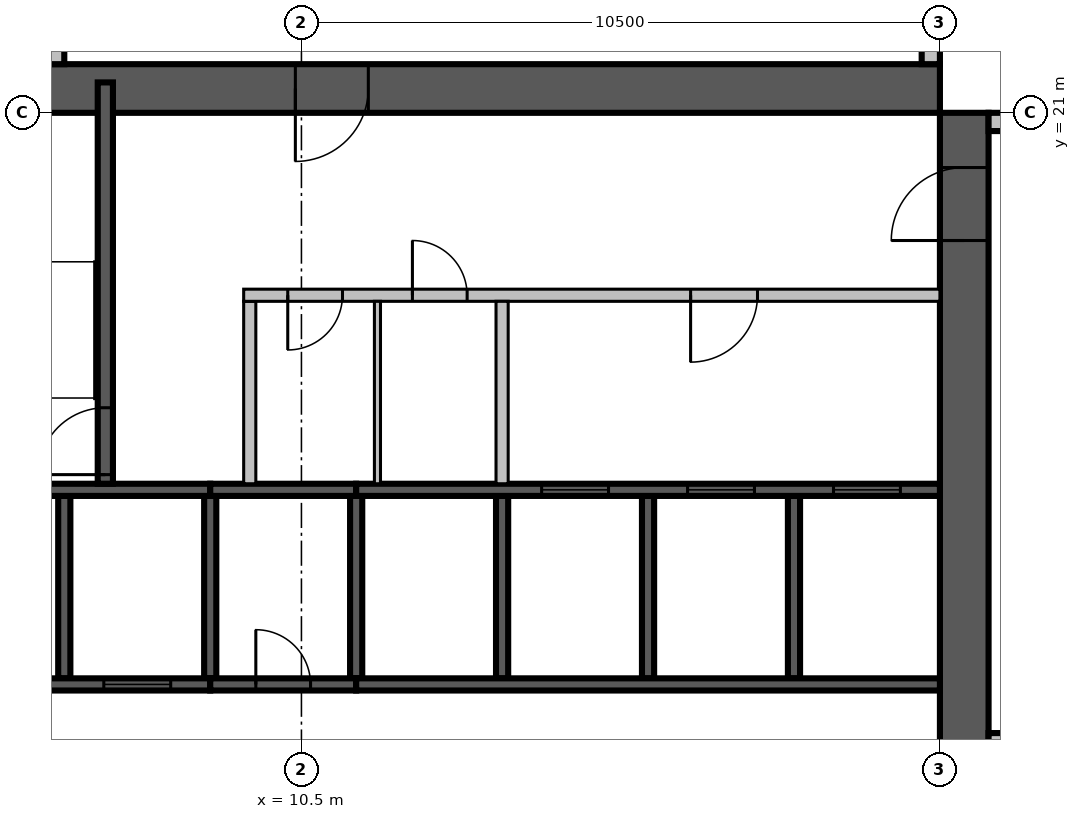
"""IFC4 building model, lengths in metres.
Left out: names, types, materials, properties, quantities, classifications, styles, units other than length and angle.
Written with IfcOpenShell. Run it as: python <this file> out.ifc"""

import sys

from ifc_helpers import new_model, si_unit, direction, frame, frame_2d, origin, place, context, subcontext, project, spatial, rectangle, extrude, source, transform, mapped, element, fill, save


model = new_model("IFC4")
c1 = context("Model", 3, precision=1e-05, world=origin(), true_north=direction((0.0, 1.0)))
c2 = subcontext(c1, "Body", "Model", "MODEL_VIEW")
j1 = project(units=[si_unit("LENGTHUNIT", "METRE"), si_unit("PLANEANGLEUNIT", "RADIAN")], contexts=[c1])
p1 = place(None, origin())
s1 = spatial("IfcSite", under=j1, at=p1, CompositionType="ELEMENT")
p2 = place(p1, origin())
s2 = spatial("IfcBuilding", under=s1, at=p2, CompositionType="ELEMENT")
p3 = place(p2, frame((0.0, 0.0, 253.8)))
s3 = spatial("IfcBuildingStorey", under=s2, at=p3, CompositionType="ELEMENT", Elevation=253.8)
m1 = source(origin(), c2, "Body", "SweptSolid", [
    extrude(rectangle(XDim=16.8, YDim=0.8, at=frame_2d((8.4, 0.0))), origin(), (0.0, 0.0, 1.0), 3.8),
])
p4 = place(p3, frame((21.4, 4.2, 0.0), z_axis=(0.0, 0.0, 1.0), x_axis=(0.0, 1.0, 0.0)))
e1 = element("IfcWall", 1, at=p4, inside=s3, PredefinedType="SHEAR", context=c2, shape_type="MappedRepresentation", body=[
    mapped(m1, transform((0.0, 0.0, 0.0), scale=1.0)),
])
m2 = source(origin(), c2, "Body", "SweptSolid", [
    extrude(rectangle(XDim=2.2, YDim=2.1, at=frame_2d((1.1, 1.05))), frame((0.0, 0.41, 0.0), z_axis=(0.0, -1.0, 0.0), x_axis=(1.0, 0.0, 0.0)), (0.0, 0.0, 1.0), 0.82),
])
p5 = place(p4, frame((4.2, 0.0, 0.0)))
e2 = element("IfcOpeningElement", 2, at=p5, cuts=e1, PredefinedType="OPENING", context=c2, shape_type="MappedRepresentation", body=[
    mapped(m2, transform((0.0, 0.0, 0.0), scale=1.0)),
])
m3 = source(origin(), c2, "Body", "SweptSolid", [
    extrude(rectangle(XDim=1.2, YDim=2.1, at=frame_2d((0.6, 1.05))), frame((0.0, 0.41, 0.0), z_axis=(0.0, -1.0, 0.0), x_axis=(1.0, 0.0, 0.0)), (0.0, 0.0, 1.0), 0.82),
])
p6 = place(p4, frame((14.7, 0.0, 0.0)))
e3 = element("IfcOpeningElement", 3, at=p6, cuts=e1, PredefinedType="OPENING", context=c2, shape_type="MappedRepresentation", body=[
    mapped(m3, transform((0.0, 0.0, 0.0), scale=1.0)),
])
p7 = place(p3, frame((4.2, 21.4, 0.0), z_axis=(0.0, 0.0, 1.0), x_axis=(1.0, 0.0, 0.0)))
e4 = element("IfcWall", 4, at=p7, inside=s3, PredefinedType="SHEAR", context=c2, shape_type="MappedRepresentation", body=[
    mapped(m1, transform((0.0, 0.0, 0.0), scale=1.0)),
])
p8 = place(p7, frame((6.2, 0.0, 0.0)))
e5 = element("IfcOpeningElement", 5, at=p8, cuts=e4, PredefinedType="OPENING", context=c2, shape_type="MappedRepresentation", body=[
    mapped(m3, transform((0.0, 0.0, 0.0), scale=1.0)),
])
m4 = source(origin(), c2, "Body", "SweptSolid", [
    extrude(rectangle(XDim=7.2, YDim=0.3, at=frame_2d((3.6, 0.0))), origin(), (0.0, 0.0, 1.0), 3.4),
])
p9 = place(p3, frame((21.8, 10.65, 0.0), z_axis=(0.0, 0.0, 1.0), x_axis=(1.0, 0.0, 0.0)))
e6 = element("IfcWall", 6, at=p9, inside=s3, PredefinedType="STANDARD", context=c2, shape_type="MappedRepresentation", body=[
    mapped(m4, transform((0.0, 0.0, 0.0), scale=1.0)),
])
m5 = source(origin(), c2, "Body", "SweptSolid", [
    extrude(rectangle(XDim=1.8, YDim=2.4, at=frame_2d((0.9, 1.2))), frame((0.0, 0.16, 0.0), z_axis=(0.0, -1.0, 0.0), x_axis=(1.0, 0.0, 0.0)), (0.0, 0.0, 1.0), 0.32),
])
p10 = place(p9, frame((0.4, 0.0, 0.0)))
e7 = element("IfcOpeningElement", 7, at=p10, cuts=e6, PredefinedType="OPENING", context=c2, shape_type="MappedRepresentation", body=[
    mapped(m5, transform((0.0, 0.0, 0.0), scale=1.0)),
])
p11 = place(p9, frame((4.6, 0.0, 0.0)))
e8 = element("IfcOpeningElement", 8, at=p11, cuts=e6, PredefinedType="OPENING", context=c2, shape_type="MappedRepresentation", body=[
    mapped(m5, transform((0.0, 0.0, 0.0), scale=1.0)),
])
p12 = place(p3, frame((29.0, 20.85, 0.0), z_axis=(0.0, 0.0, 1.0), x_axis=(-1.0, 0.0, 0.0)))
e9 = element("IfcWall", 9, at=p12, inside=s3, PredefinedType="STANDARD", context=c2, shape_type="MappedRepresentation", body=[
    mapped(m4, transform((0.0, 0.0, 0.0), scale=1.0)),
])
m6 = source(origin(), c2, "Body", "SweptSolid", [
    extrude(rectangle(XDim=1.8, YDim=2.3, at=frame_2d((0.9, 1.15))), frame((0.0, 0.16, 0.0), z_axis=(0.0, -1.0, 0.0), x_axis=(1.0, 0.0, 0.0)), (0.0, 0.0, 1.0), 0.32),
])
p13 = place(p12, frame((0.613, 0.0, 0.6)))
e10 = element("IfcOpeningElement", 10, at=p13, cuts=e9, PredefinedType="OPENING", context=c2, shape_type="MappedRepresentation", body=[
    mapped(m6, transform((0.0, 0.0, 0.0), scale=1.0)),
])
p14 = place(p12, frame((5.0, 0.0, 0.6)))
e11 = element("IfcOpeningElement", 11, at=p14, cuts=e9, PredefinedType="OPENING", context=c2, shape_type="MappedRepresentation", body=[
    mapped(m6, transform((0.0, 0.0, 0.0), scale=1.0)),
])
m7 = source(origin(), c2, "Body", "SweptSolid", [
    extrude(rectangle(XDim=7.2, YDim=0.3, at=frame_2d((3.6, 0.0))), origin(), (0.0, 0.0, 1.0), 2.9),
])
p15 = place(p3, frame((20.85, 21.8, 0.0), z_axis=(0.0, 0.0, 1.0), x_axis=(0.0, 1.0, 0.0)))
e12 = element("IfcWall", 12, at=p15, inside=s3, PredefinedType="STANDARD", context=c2, shape_type="MappedRepresentation", body=[
    mapped(m7, transform((0.0, 0.0, 0.0), scale=1.0)),
])
p16 = place(p15, frame((0.4, 0.0, 0.6)))
e13 = element("IfcOpeningElement", 13, at=p16, cuts=e12, PredefinedType="OPENING", context=c2, shape_type="MappedRepresentation", body=[
    mapped(m6, transform((0.0, 0.0, 0.0), scale=1.0)),
])
p17 = place(p15, frame((4.787, 0.0, 0.6)))
e14 = element("IfcOpeningElement", 14, at=p17, cuts=e12, PredefinedType="OPENING", context=c2, shape_type="MappedRepresentation", body=[
    mapped(m6, transform((0.0, 0.0, 0.0), scale=1.0)),
])
m8 = source(origin(), c2, "Body", "SweptSolid", [
    extrude(rectangle(XDim=16.6, YDim=0.3, at=frame_2d((8.3, 0.0))), origin(), (0.0, 0.0, 1.0), 3.4),
])
p18 = place(p3, frame((6.45, 38.4, 0.0), z_axis=(0.0, 0.0, 1.0), x_axis=(0.0, -1.0, 0.0)))
e15 = element("IfcWall", 15, at=p18, inside=s3, PredefinedType="STANDARD", context=c2, shape_type="MappedRepresentation", body=[
    mapped(m8, transform((0.0, 0.0, 0.0), scale=1.0)),
])
p19 = place(p18, frame((1.15, 0.0, 0.6)))
e16 = element("IfcOpeningElement", 16, at=p19, cuts=e15, PredefinedType="OPENING", context=c2, shape_type="MappedRepresentation", body=[
    mapped(m6, transform((0.0, 0.0, 0.0), scale=1.0)),
])
p20 = place(p18, frame((9.438, 0.0, 0.6)))
e17 = element("IfcOpeningElement", 17, at=p20, cuts=e15, PredefinedType="OPENING", context=c2, shape_type="MappedRepresentation", body=[
    mapped(m6, transform((0.0, 0.0, 0.0), scale=1.0)),
])
m9 = source(origin(), c2, "Body", "SweptSolid", [
    extrude(rectangle(XDim=3.0, YDim=2.3, at=frame_2d((1.5, 1.15))), frame((0.0, 0.16, 0.0), z_axis=(0.0, -1.0, 0.0), x_axis=(1.0, 0.0, 0.0)), (0.0, 0.0, 1.0), 0.32),
])
p21 = place(p18, frame((12.7, 0.0, 0.6)))
e18 = element("IfcOpeningElement", 18, at=p21, cuts=e15, PredefinedType="OPENING", context=c2, shape_type="MappedRepresentation", body=[
    mapped(m9, transform((0.0, 0.0, 0.0), scale=1.0)),
])
m10 = source(origin(), c2, "Body", "SweptSolid", [
    extrude(rectangle(XDim=1.0, YDim=2.1, at=frame_2d((0.5, 1.05))), frame((0.0, 0.16, 0.0), z_axis=(0.0, -1.0, 0.0), x_axis=(1.0, 0.0, 0.0)), (0.0, 0.0, 1.0), 0.32),
])
p22 = place(p18, frame((5.45, 0.0, 0.0)))
e19 = element("IfcOpeningElement", 19, at=p22, cuts=e15, PredefinedType="OPENING", context=c2, shape_type="MappedRepresentation", body=[
    mapped(m10, transform((0.0, 0.0, 0.0), scale=1.0)),
])
m11 = source(origin(), c2, "Body", "SweptSolid", [
    extrude(rectangle(XDim=3.0, YDim=0.2, at=frame_2d((1.5, 0.0))), origin(), (0.0, 0.0, 1.0), 3.8),
])
p23 = place(p3, frame((6.6, 11.7, 0.0), z_axis=(0.0, 0.0, 1.0), x_axis=(0.0, 1.0, 0.0)))
e20 = element("IfcWall", 20, at=p23, inside=s3, PredefinedType="SOLIDWALL", context=c2, shape_type="MappedRepresentation", body=[
    mapped(m11, transform((0.0, 0.0, 0.0), scale=1.0)),
])
m12 = source(origin(), c2, "Body", "SweptSolid", [
    extrude(rectangle(XDim=3.0, YDim=0.2, at=frame_2d((1.5, 0.0))), origin(), (0.0, 0.0, 1.0), 3.4),
])
for number, where, z_axis, x_axis in (
    (21, (9.0, 11.7, 0.0), (0.0, 0.0, 1.0), (0.0, 1.0, 0.0)),
    (22, (11.4, 11.7, 0.0), (0.0, 0.0, 1.0), (0.0, 1.0, 0.0)),
):
    element("IfcWall", number, at=place(p3, frame(where, z_axis=z_axis, x_axis=x_axis)), inside=s3, PredefinedType="SOLIDWALL", context=c2, shape_type="MappedRepresentation", body=[
        mapped(m12, transform((0.0, 0.0, 0.0), scale=1.0)),
    ])
for number, where, z_axis, x_axis in (
    (23, (13.8, 11.7, 0.0), (0.0, 0.0, 1.0), (0.0, 1.0, 0.0)),
    (24, (16.2, 11.7, 0.0), (0.0, 0.0, 1.0), (0.0, 1.0, 0.0)),
    (25, (18.6, 11.7, 0.0), (0.0, 0.0, 1.0), (0.0, 1.0, 0.0)),
):
    element("IfcWall", number, at=place(p3, frame(where, z_axis=z_axis, x_axis=x_axis)), inside=s3, PredefinedType="SOLIDWALL", context=c2, shape_type="MappedRepresentation", body=[
        mapped(m11, transform((0.0, 0.0, 0.0), scale=1.0)),
    ])
m13 = source(origin(), c2, "Body", "SweptSolid", [
    extrude(rectangle(XDim=4.8, YDim=0.2, at=frame_2d((2.4, 0.0))), origin(), (0.0, 0.0, 1.0), 3.8),
])
p24 = place(p3, frame((4.2, 11.6, 0.0), z_axis=(0.0, 0.0, 1.0), x_axis=(1.0, 0.0, 0.0)))
e26 = element("IfcWall", 26, at=p24, inside=s3, PredefinedType="SOLIDWALL", context=c2, shape_type="MappedRepresentation", body=[
    mapped(m13, transform((0.0, 0.0, 0.0), scale=1.0)),
])
m14 = source(origin(), c2, "Body", "SweptSolid", [
    extrude(rectangle(XDim=1.1, YDim=2.1, at=frame_2d((0.55, 1.05))), frame((0.0, 0.11, 0.0), z_axis=(0.0, -1.0, 0.0), x_axis=(1.0, 0.0, 0.0)), (0.0, 0.0, 1.0), 0.22),
])
p25 = place(p24, frame((0.65, 0.0, 0.0)))
e27 = element("IfcOpeningElement", 27, at=p25, cuts=e26, PredefinedType="OPENING", context=c2, shape_type="MappedRepresentation", body=[
    mapped(m14, transform((0.0, 0.0, 0.0), scale=1.0)),
])
p26 = place(p24, frame((3.05, 0.0, 0.0)))
e28 = element("IfcOpeningElement", 28, at=p26, cuts=e26, PredefinedType="OPENING", context=c2, shape_type="MappedRepresentation", body=[
    mapped(m14, transform((0.0, 0.0, 0.0), scale=1.0)),
])
m15 = source(origin(), c2, "Body", "SweptSolid", [
    extrude(rectangle(XDim=2.4, YDim=0.2, at=frame_2d((1.2, 0.0))), origin(), (0.0, 0.0, 1.0), 3.4),
])
p27 = place(p3, frame((9.0, 11.6, 0.0), z_axis=(0.0, 0.0, 1.0), x_axis=(1.0, 0.0, 0.0)))
e29 = element("IfcWall", 29, at=p27, inside=s3, PredefinedType="SOLIDWALL", context=c2, shape_type="MappedRepresentation", body=[
    mapped(m15, transform((0.0, 0.0, 0.0), scale=1.0)),
])
m16 = source(origin(), c2, "Body", "SweptSolid", [
    extrude(rectangle(XDim=0.9, YDim=2.1, at=frame_2d((0.45, 1.05))), frame((0.0, 0.11, 0.0), z_axis=(0.0, -1.0, 0.0), x_axis=(1.0, 0.0, 0.0)), (0.0, 0.0, 1.0), 0.22),
])
p28 = place(p27, frame((0.75, 0.0, 0.0)))
e30 = element("IfcOpeningElement", 30, at=p28, cuts=e29, PredefinedType="OPENING", context=c2, shape_type="MappedRepresentation", body=[
    mapped(m16, transform((0.0, 0.0, 0.0), scale=1.0)),
])
m17 = source(origin(), c2, "Body", "SweptSolid", [
    extrude(rectangle(XDim=9.6, YDim=0.2, at=frame_2d((4.8, 0.0))), origin(), (0.0, 0.0, 1.0), 3.8),
])
p29 = place(p3, frame((11.4, 11.6, 0.0), z_axis=(0.0, 0.0, 1.0), x_axis=(1.0, 0.0, 0.0)))
e31 = element("IfcWall", 31, at=p29, inside=s3, PredefinedType="SOLIDWALL", context=c2, shape_type="MappedRepresentation", body=[
    mapped(m17, transform((0.0, 0.0, 0.0), scale=1.0)),
])
p30 = place(p3, frame((4.2, 14.8, 0.0), z_axis=(0.0, 0.0, 1.0), x_axis=(1.0, 0.0, 0.0)))
e32 = element("IfcWall", 32, at=p30, inside=s3, PredefinedType="SOLIDWALL", context=c2, shape_type="MappedRepresentation", body=[
    mapped(m13, transform((0.0, 0.0, 0.0), scale=1.0)),
])
p31 = place(p3, frame((9.0, 14.8, 0.0), z_axis=(0.0, 0.0, 1.0), x_axis=(1.0, 0.0, 0.0)))
e33 = element("IfcWall", 33, at=p31, inside=s3, PredefinedType="SOLIDWALL", context=c2, shape_type="MappedRepresentation", body=[
    mapped(m15, transform((0.0, 0.0, 0.0), scale=1.0)),
])
p32 = place(p3, frame((11.4, 14.8, 0.0), z_axis=(0.0, 0.0, 1.0), x_axis=(1.0, 0.0, 0.0)))
e34 = element("IfcWall", 34, at=p32, inside=s3, PredefinedType="SOLIDWALL", context=c2, shape_type="MappedRepresentation", body=[
    mapped(m17, transform((0.0, 0.0, 0.0), scale=1.0)),
])
p33 = place(p32, frame((3.05, 0.0, 0.0)))
e35 = element("IfcOpeningElement", 35, at=p33, cuts=e34, PredefinedType="OPENING", context=c2, shape_type="MappedRepresentation", body=[
    mapped(m14, transform((0.0, 0.0, 0.0), scale=1.0)),
])
p34 = place(p32, frame((5.45, 0.0, 0.0)))
e36 = element("IfcOpeningElement", 36, at=p34, cuts=e34, PredefinedType="OPENING", context=c2, shape_type="MappedRepresentation", body=[
    mapped(m14, transform((0.0, 0.0, 0.0), scale=1.0)),
])
p35 = place(p32, frame((7.85, 0.0, 0.0)))
e37 = element("IfcOpeningElement", 37, at=p35, cuts=e34, PredefinedType="OPENING", context=c2, shape_type="MappedRepresentation", body=[
    mapped(m14, transform((0.0, 0.0, 0.0), scale=1.0)),
])
m18 = source(origin(), c2, "Body", "SweptSolid", [
    extrude(rectangle(XDim=6.6, YDim=0.25, at=frame_2d((3.3, 0.0))), origin(), (0.0, 0.0, 1.0), 3.4),
])
p36 = place(p3, frame((7.275, 14.9, 0.0), z_axis=(0.0, 0.0, 1.0), x_axis=(0.0, 1.0, 0.0)))
e38 = element("IfcWall", 38, at=p36, inside=s3, PredefinedType="SOLIDWALL", context=c2, shape_type="MappedRepresentation", body=[
    mapped(m18, transform((0.0, 0.0, 0.0), scale=1.0)),
])
m19 = source(origin(), c2, "Body", "SweptSolid", [
    extrude(rectangle(XDim=1.1, YDim=2.1, at=frame_2d((0.55, 1.05))), frame((0.0, 0.135, 0.0), z_axis=(0.0, -1.0, 0.0), x_axis=(1.0, 0.0, 0.0)), (0.0, 0.0, 1.0), 0.27),
])
p37 = place(p36, frame((0.15, 0.0, 0.0)))
e39 = element("IfcOpeningElement", 39, at=p37, cuts=e38, PredefinedType="OPENING", context=c2, shape_type="MappedRepresentation", body=[
    mapped(m19, transform((0.0, 0.0, 0.0), scale=1.0)),
])
m20 = source(origin(), c2, "Body", "SweptSolid", [
    extrude(rectangle(XDim=3.0, YDim=0.2, at=frame_2d((1.5, 0.0))), origin(), (0.0, 0.0, 1.0), 3.4),
])
p38 = place(p3, frame((9.65, 14.9, 0.0), z_axis=(0.0, 0.0, 1.0), x_axis=(0.0, 1.0, 0.0)))
e40 = element("IfcWall", 40, at=p38, inside=s3, PredefinedType="PARTITIONING", context=c2, shape_type="MappedRepresentation", body=[
    mapped(m20, transform((0.0, 0.0, 0.0), scale=1.0)),
])
m21 = source(origin(), c2, "Body", "SweptSolid", [
    extrude(rectangle(XDim=11.45, YDim=0.2, at=frame_2d((5.725, 0.0))), origin(), (0.0, 0.0, 1.0), 3.4),
])
p39 = place(p3, frame((9.55, 18.0, 0.0), z_axis=(0.0, 0.0, 1.0), x_axis=(1.0, 0.0, 0.0)))
e41 = element("IfcWall", 41, at=p39, inside=s3, PredefinedType="PARTITIONING", context=c2, shape_type="MappedRepresentation", body=[
    mapped(m21, transform((0.0, 0.0, 0.0), scale=1.0)),
])
p40 = place(p39, frame((0.725, 0.0, 0.0)))
e42 = element("IfcOpeningElement", 42, at=p40, cuts=e41, PredefinedType="OPENING", context=c2, shape_type="MappedRepresentation", body=[
    mapped(m16, transform((0.0, 0.0, 0.0), scale=1.0)),
])
p41 = place(p39, frame((2.775, 0.0, 0.0)))
e43 = element("IfcOpeningElement", 43, at=p41, cuts=e41, PredefinedType="OPENING", context=c2, shape_type="MappedRepresentation", body=[
    mapped(m16, transform((0.0, 0.0, 0.0), scale=1.0)),
])
p42 = place(p39, frame((7.35, 0.0, 0.0)))
e44 = element("IfcOpeningElement", 44, at=p42, cuts=e41, PredefinedType="OPENING", context=c2, shape_type="MappedRepresentation", body=[
    mapped(m14, transform((0.0, 0.0, 0.0), scale=1.0)),
])
p43 = place(p3, frame((13.8, 14.9, 0.0), z_axis=(0.0, 0.0, 1.0), x_axis=(0.0, 1.0, 0.0)))
e45 = element("IfcWall", 45, at=p43, inside=s3, PredefinedType="PARTITIONING", context=c2, shape_type="MappedRepresentation", body=[
    mapped(m20, transform((0.0, 0.0, 0.0), scale=1.0)),
])
m22 = source(origin(), c2, "Body", "SweptSolid", [
    extrude(rectangle(XDim=3.0, YDim=0.1, at=frame_2d((1.5, 0.0))), origin(), (0.0, 0.0, 1.0), 3.4),
])
p44 = place(p3, frame((11.75, 14.9, 0.0), z_axis=(0.0, 0.0, 1.0), x_axis=(0.0, 1.0, 0.0)))
e46 = element("IfcWall", 46, at=p44, inside=s3, PredefinedType="PARTITIONING", context=c2, shape_type="MappedRepresentation", body=[
    mapped(m22, transform((0.0, 0.0, 0.0), scale=1.0)),
])
m23 = source(origin(), c2, "Body", "SweptSolid", [
    extrude(rectangle(XDim=1.1, YDim=2.1, at=frame_2d((0.55, 1.05))), frame((0.0, 0.025, 0.0), z_axis=(0.0, -1.0, 0.0), x_axis=(1.0, 0.0, 0.0)), (0.0, 0.0, 1.0), 0.05),
])
p45 = place(p26, origin())
e47 = element("IfcDoor", 47, at=p45, inside=s3, OperationType="SLIDING_TO_LEFT", PredefinedType="DOOR", context=c2, shape_type="MappedRepresentation", body=[
    mapped(m23, transform((0.0, 0.0, 0.0), scale=1.0)),
])
fill(e28, e47)
m24 = source(origin(), c2, "Body", "SweptSolid", [
    extrude(rectangle(XDim=0.9, YDim=2.1, at=frame_2d((0.45, 1.05))), frame((0.0, 0.025, 0.0), z_axis=(0.0, -1.0, 0.0), x_axis=(1.0, 0.0, 0.0)), (0.0, 0.0, 1.0), 0.05),
])
p46 = place(p28, origin())
e48 = element("IfcDoor", 48, at=p46, inside=s3, OperationType="SINGLE_SWING_LEFT", PredefinedType="DOOR", context=c2, shape_type="MappedRepresentation", body=[
    mapped(m24, transform((0.0, 0.0, 0.0), scale=1.0)),
])
fill(e30, e48)
p47 = place(p33, origin())
e49 = element("IfcDoor", 49, at=p47, inside=s3, OperationType="SLIDING_TO_LEFT", PredefinedType="DOOR", context=c2, shape_type="MappedRepresentation", body=[
    mapped(m23, transform((0.0, 0.0, 0.0), scale=1.0)),
])
fill(e35, e49)
p48 = place(p34, origin())
e50 = element("IfcDoor", 50, at=p48, inside=s3, OperationType="SLIDING_TO_LEFT", PredefinedType="DOOR", context=c2, shape_type="MappedRepresentation", body=[
    mapped(m23, transform((0.0, 0.0, 0.0), scale=1.0)),
])
fill(e36, e50)
p49 = place(p35, origin())
e51 = element("IfcDoor", 51, at=p49, inside=s3, OperationType="SLIDING_TO_LEFT", PredefinedType="DOOR", context=c2, shape_type="MappedRepresentation", body=[
    mapped(m23, transform((0.0, 0.0, 0.0), scale=1.0)),
])
fill(e37, e51)
p50 = place(p37, origin())
e52 = element("IfcDoor", 52, at=p50, inside=s3, OperationType="SINGLE_SWING_LEFT", PredefinedType="DOOR", context=c2, shape_type="MappedRepresentation", body=[
    mapped(m23, transform((0.0, 0.0, 0.0), scale=1.0)),
])
fill(e39, e52)
p51 = place(p40, origin())
e53 = element("IfcDoor", 53, at=p51, inside=s3, OperationType="SINGLE_SWING_RIGHT", PredefinedType="DOOR", context=c2, shape_type="MappedRepresentation", body=[
    mapped(m24, transform((0.0, 0.0, 0.0), scale=1.0)),
])
fill(e42, e53)
p52 = place(p41, origin())
e54 = element("IfcDoor", 54, at=p52, inside=s3, OperationType="SINGLE_SWING_LEFT", PredefinedType="DOOR", context=c2, shape_type="MappedRepresentation", body=[
    mapped(m24, transform((0.0, 0.0, 0.0), scale=1.0)),
])
fill(e43, e54)
p53 = place(p42, origin())
e55 = element("IfcDoor", 55, at=p53, inside=s3, OperationType="SINGLE_SWING_RIGHT", PredefinedType="DOOR", context=c2, shape_type="MappedRepresentation", body=[
    mapped(m23, transform((0.0, 0.0, 0.0), scale=1.0)),
])
fill(e44, e55)
m25 = source(origin(), c2, "Body", "SweptSolid", [
    extrude(rectangle(XDim=1.2, YDim=2.1, at=frame_2d((0.6, 1.05))), frame((0.0, 0.025, 0.0), z_axis=(0.0, -1.0, 0.0), x_axis=(1.0, 0.0, 0.0)), (0.0, 0.0, 1.0), 0.05),
])
p54 = place(p8, origin())
e56 = element("IfcDoor", 56, at=p54, inside=s3, OperationType="SINGLE_SWING_RIGHT", PredefinedType="DOOR", context=c2, shape_type="MappedRepresentation", body=[
    mapped(m25, transform((0.0, 0.0, 0.0), scale=1.0)),
])
fill(e5, e56)
p55 = place(p6, origin())
e57 = element("IfcDoor", 57, at=p55, inside=s3, OperationType="SINGLE_SWING_LEFT", PredefinedType="DOOR", context=c2, shape_type="MappedRepresentation", body=[
    mapped(m25, transform((0.0, 0.0, 0.0), scale=1.0)),
])
fill(e3, e57)
save(model, sys.argv[1])
